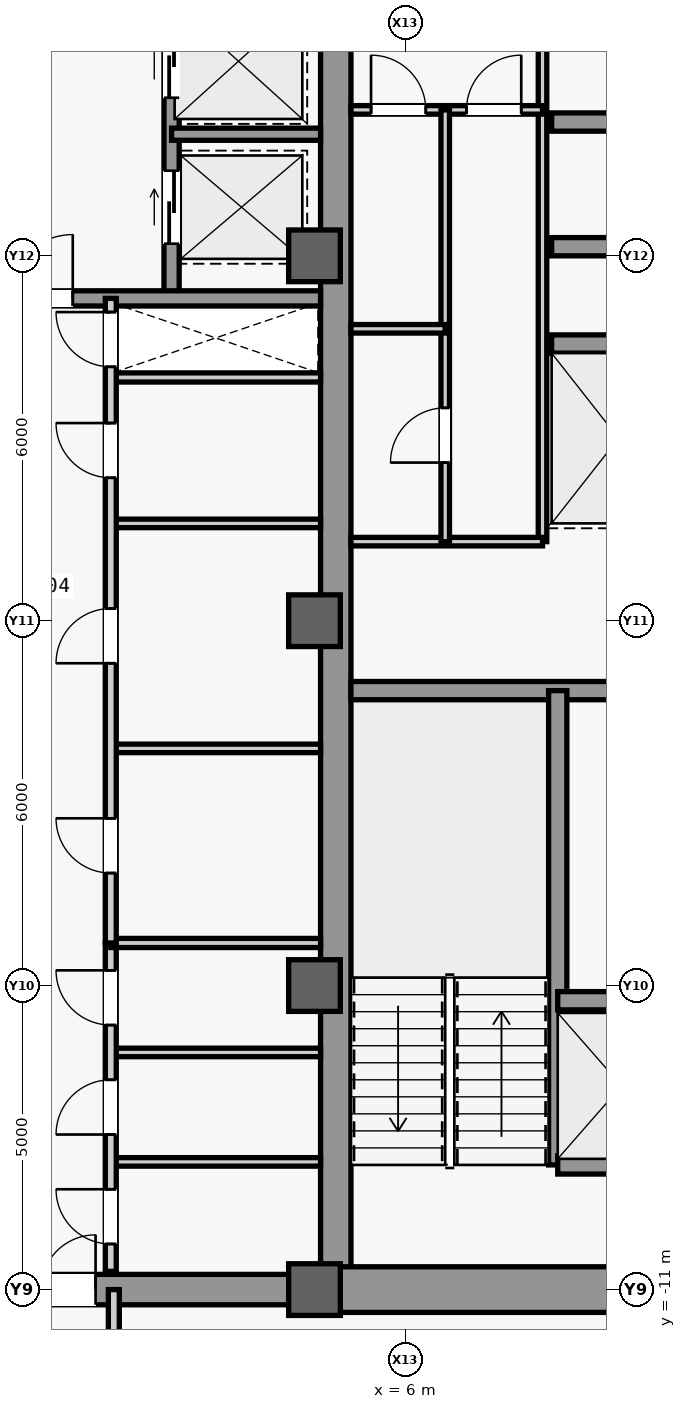
"""IFC4 building model, lengths in metres.
Left out: names, types, materials, properties, quantities, classifications, styles, units other than length and angle.
Written with IfcOpenShell. Run it as: python <this file> out.ifc"""

import sys

from ifc_helpers import new_model, si_unit, direction, frame, frame_2d, origin, origin_2d, place, context, subcontext, project, spatial, rectangle, extrude, source, transform, mapped, element, fill, save


model = new_model("IFC4")
c1 = context("Model", 3, precision=1e-05, world=origin(), true_north=direction((0.0, 1.0)))
c2 = subcontext(c1, "Body", "Model", "MODEL_VIEW")
j1 = project(units=[si_unit("LENGTHUNIT", "METRE"), si_unit("PLANEANGLEUNIT", "RADIAN")], contexts=[c1])
p1 = place(None, origin())
s1 = spatial("IfcSite", under=j1, at=p1, CompositionType="ELEMENT")
p2 = place(p1, origin())
s2 = spatial("IfcBuilding", under=s1, at=p2, CompositionType="ELEMENT")
p3 = place(p2, frame((0.0, 0.0, 183.1)))
s3 = spatial("IfcBuildingStorey", under=s2, at=p3, CompositionType="ELEMENT", Elevation=183.1)
m1 = source(origin(), c2, "Body", "SweptSolid", [
    extrude(rectangle(XDim=21.4, YDim=0.5, at=frame_2d((10.7, 0.0))), origin(), (0.0, 0.0, 1.0), 3.78),
])
p4 = place(p3, frame((4.85, -10.7, 0.0), z_axis=(0.0, 0.0, 1.0), x_axis=(0.0, 1.0, 0.0)))
e1 = element("IfcWall", 1, at=p4, inside=s3, PredefinedType="SHEAR", context=c2, shape_type="MappedRepresentation", body=[
    mapped(m1, transform((0.0, 0.0, 0.0), scale=1.0)),
])
m2 = source(origin(), c2, "Body", "SweptSolid", [
    extrude(rectangle(XDim=5.85, YDim=0.75, at=frame_2d((2.925, 0.0))), origin(), (0.0, 0.0, 1.0), 3.78),
])
p5 = place(p3, frame((4.85, -11.0, 0.0), z_axis=(0.0, 0.0, 1.0), x_axis=(1.0, 0.0, 0.0)))
e2 = element("IfcWall", 2, at=p5, inside=s3, PredefinedType="SHEAR", context=c2, shape_type="MappedRepresentation", body=[
    mapped(m2, transform((0.0, 0.0, 0.0), scale=1.0)),
])
m3 = source(origin(), c2, "Body", "SweptSolid", [
    extrude(rectangle(XDim=5.6, YDim=0.3, at=frame_2d((2.8, 0.0))), origin(), (0.0, 0.0, 1.0), 3.78),
])
p6 = place(p3, frame((5.1, -1.15, 0.0), z_axis=(0.0, 0.0, 1.0), x_axis=(1.0, 0.0, 0.0)))
e3 = element("IfcWall", 3, at=p6, inside=s3, PredefinedType="SHEAR", context=c2, shape_type="MappedRepresentation", body=[
    mapped(m3, transform((0.0, 0.0, 0.0), scale=1.0)),
])
m4 = source(origin(), c2, "Body", "SweptSolid", [
    extrude(rectangle(XDim=9.2, YDim=0.5, at=frame_2d((4.6, 0.0))), origin(), (0.0, 0.0, 1.0), 3.78),
])
p7 = place(p3, frame((-4.6, -11.0, 0.0), z_axis=(0.0, 0.0, 1.0), x_axis=(1.0, 0.0, 0.0)))
e4 = element("IfcWall", 4, at=p7, inside=s3, PredefinedType="SHEAR", context=c2, shape_type="MappedRepresentation", body=[
    mapped(m4, transform((0.0, 0.0, 0.0), scale=1.0)),
])
m5 = source(origin(), c2, "Body", "SweptSolid", [
    extrude(rectangle(XDim=1.8, YDim=2.25, at=frame_2d((0.9, 1.125))), frame((0.0, 0.26, 0.0), z_axis=(0.0, -1.0, 0.0), x_axis=(1.0, 0.0, 0.0)), (0.0, 0.0, 1.0), 0.52),
])
p8 = place(p7, frame((3.7, 0.0, 0.0)))
e5 = element("IfcOpeningElement", 5, at=p8, cuts=e4, PredefinedType="OPENING", context=c2, shape_type="MappedRepresentation", body=[
    mapped(m5, transform((0.0, 0.0, 0.0), scale=1.0)),
])
m6 = source(origin(), c2, "Body", "SweptSolid", [
    extrude(rectangle(XDim=0.85, YDim=0.85, at=origin_2d()), origin(), (0.0, 0.0, 1.0), 4.0),
])
for number, where, z_axis, x_axis in (
    (6, (4.5, -11.0, 0.0), (0.0, 0.0, 1.0), (1.0, 0.0, 0.0)),
    (7, (4.5, -6.0, 0.0), (0.0, 0.0, 1.0), (1.0, 0.0, 0.0)),
    (8, (4.5, 0.0, 0.0), (0.0, 0.0, 1.0), (1.0, 0.0, 0.0)),
    (9, (4.5, 6.0, 0.0), (0.0, 0.0, 1.0), (1.0, 0.0, 0.0)),
):
    element("IfcColumn", number, at=place(p3, frame(where, z_axis=z_axis, x_axis=x_axis)), inside=s3, PredefinedType="COLUMN", context=c2, shape_type="MappedRepresentation", body=[
        mapped(m6, transform((0.0, 0.0, 0.0), scale=1.0)),
    ])
m7 = source(origin(), c2, "Body", "SweptSolid", [
    extrude(rectangle(XDim=7.8, YDim=0.3, at=frame_2d((3.9, 0.0))), origin(), (0.0, 0.0, 1.0), 3.78),
])
p9 = place(p3, frame((8.5, -8.95, 0.0), z_axis=(0.0, 0.0, 1.0), x_axis=(0.0, 1.0, 0.0)))
e10 = element("IfcWall", 10, at=p9, inside=s3, PredefinedType="SHEAR", context=c2, shape_type="MappedRepresentation", body=[
    mapped(m7, transform((0.0, 0.0, 0.0), scale=1.0)),
])
m8 = source(origin(), c2, "Body", "SweptSolid", [
    extrude(rectangle(XDim=2.2, YDim=0.3, at=frame_2d((1.1, 0.0))), origin(), (0.0, 0.0, 1.0), 3.78),
])
for number, where, z_axis, x_axis in (
    (11, (8.5, -8.95, 0.0), (0.0, 0.0, 1.0), (1.0, 0.0, 0.0)),
    (12, (8.5, -6.25, 0.0), (0.0, 0.0, 1.0), (1.0, 0.0, 0.0)),
):
    element("IfcWall", number, at=place(p3, frame(where, z_axis=z_axis, x_axis=x_axis)), inside=s3, PredefinedType="SHEAR", context=c2, shape_type="MappedRepresentation", body=[
        mapped(m8, transform((0.0, 0.0, 0.0), scale=1.0)),
    ])
m9 = source(origin(), c2, "Body", "SweptSolid", [
    extrude(rectangle(XDim=2.3, YDim=0.3, at=frame_2d((1.15, 0.0))), origin(), (0.0, 0.0, 1.0), 3.78),
])
for number, where, z_axis, x_axis in (
    (13, (8.4, 4.55, 0.0), (0.0, 0.0, 1.0), (1.0, 0.0, 0.0)),
    (14, (8.4, 6.15, 0.0), (0.0, 0.0, 1.0), (1.0, 0.0, 0.0)),
    (15, (8.4, 8.2, 0.0), (0.0, 0.0, 1.0), (1.0, 0.0, 0.0)),
):
    element("IfcWall", number, at=place(p3, frame(where, z_axis=z_axis, x_axis=x_axis)), inside=s3, PredefinedType="SHEAR", context=c2, shape_type="MappedRepresentation", body=[
        mapped(m9, transform((0.0, 0.0, 0.0), scale=1.0)),
    ])
m10 = source(origin(), c2, "Body", "SweptSolid", [
    extrude(rectangle(XDim=9.4, YDim=0.14, at=frame_2d((4.7, 0.0))), origin(), (0.0, 0.0, 1.0), 3.78),
])
p10 = place(p3, frame((8.25, 1.3, 0.0), z_axis=(0.0, 0.0, 1.0), x_axis=(0.0, 1.0, 0.0)))
e16 = element("IfcWall", 16, at=p10, inside=s3, PredefinedType="PARTITIONING", context=c2, shape_type="MappedRepresentation", body=[
    mapped(m10, transform((0.0, 0.0, 0.0), scale=1.0)),
])
m11 = source(origin(), c2, "Body", "SweptSolid", [
    extrude(rectangle(XDim=3.15, YDim=0.14, at=frame_2d((1.575, 0.0))), origin(), (0.0, 0.0, 1.0), 3.78),
])
p11 = place(p3, frame((5.1, 1.3, 0.0), z_axis=(0.0, 0.0, 1.0), x_axis=(1.0, 0.0, 0.0)))
e17 = element("IfcWall", 17, at=p11, inside=s3, PredefinedType="PARTITIONING", context=c2, shape_type="MappedRepresentation", body=[
    mapped(m11, transform((0.0, 0.0, 0.0), scale=1.0)),
])
p12 = place(p3, frame((5.1, 8.4, 0.0), z_axis=(0.0, 0.0, 1.0), x_axis=(1.0, 0.0, 0.0)))
e18 = element("IfcWall", 18, at=p12, inside=s3, PredefinedType="PARTITIONING", context=c2, shape_type="MappedRepresentation", body=[
    mapped(m11, transform((0.0, 0.0, 0.0), scale=1.0)),
])
m12 = source(origin(), c2, "Body", "SweptSolid", [
    extrude(rectangle(XDim=0.9, YDim=2.15, at=frame_2d((0.45, 1.075))), frame((0.0, 0.08, 0.0), z_axis=(0.0, -1.0, 0.0), x_axis=(1.0, 0.0, 0.0)), (0.0, 0.0, 1.0), 0.16),
])
p13 = place(p12, frame((0.33, 0.0, 0.0)))
e19 = element("IfcOpeningElement", 19, at=p13, cuts=e18, PredefinedType="OPENING", context=c2, shape_type="MappedRepresentation", body=[
    mapped(m12, transform((0.0, 0.0, 0.0), scale=1.0)),
])
p14 = place(p12, frame((1.9, 0.0, 0.0)))
e20 = element("IfcOpeningElement", 20, at=p14, cuts=e18, PredefinedType="OPENING", context=c2, shape_type="MappedRepresentation", body=[
    mapped(m12, transform((0.0, 0.0, 0.0), scale=1.0)),
])
m13 = source(origin(), c2, "Body", "SweptSolid", [
    extrude(rectangle(XDim=7.1, YDim=0.14, at=frame_2d((3.55, 0.0))), origin(), (0.0, 0.0, 1.0), 3.78),
])
p15 = place(p3, frame((6.65, 1.3, 0.0), z_axis=(0.0, 0.0, 1.0), x_axis=(0.0, 1.0, 0.0)))
e21 = element("IfcWall", 21, at=p15, inside=s3, PredefinedType="PARTITIONING", context=c2, shape_type="MappedRepresentation", body=[
    mapped(m13, transform((0.0, 0.0, 0.0), scale=1.0)),
])
p16 = place(p15, frame((1.3, 0.0, 0.0)))
e22 = element("IfcOpeningElement", 22, at=p16, cuts=e21, PredefinedType="OPENING", context=c2, shape_type="MappedRepresentation", body=[
    mapped(m12, transform((0.0, 0.0, 0.0), scale=1.0)),
])
m14 = source(origin(), c2, "Body", "SweptSolid", [
    extrude(rectangle(XDim=1.55, YDim=0.14, at=frame_2d((0.775, 0.0))), origin(), (0.0, 0.0, 1.0), 3.78),
])
p17 = place(p3, frame((5.1, 4.8, 0.0), z_axis=(0.0, 0.0, 1.0), x_axis=(1.0, 0.0, 0.0)))
e23 = element("IfcWall", 23, at=p17, inside=s3, PredefinedType="PARTITIONING", context=c2, shape_type="MappedRepresentation", body=[
    mapped(m14, transform((0.0, 0.0, 0.0), scale=1.0)),
])
m15 = source(origin(), c2, "Body", "SweptSolid", [
    extrude(rectangle(XDim=3.45, YDim=0.15, at=frame_2d((1.725, 0.0))), origin(), (0.0, 0.0, 1.0), 3.78),
])
p18 = place(p3, frame((1.15, 4.0, 0.0), z_axis=(0.0, 0.0, 1.0), x_axis=(1.0, 0.0, 0.0)))
e24 = element("IfcWall", 24, at=p18, inside=s3, PredefinedType="PARTITIONING", context=c2, shape_type="MappedRepresentation", body=[
    mapped(m15, transform((0.0, 0.0, 0.0), scale=1.0)),
])
m16 = source(origin(), c2, "Body", "SweptSolid", [
    extrude(rectangle(XDim=3.45, YDim=0.14, at=frame_2d((1.725, 0.0))), origin(), (0.0, 0.0, 1.0), 3.78),
])
for number, where, z_axis, x_axis in (
    (25, (1.15, -8.9, 0.0), (0.0, 0.0, 1.0), (1.0, 0.0, 0.0)),
    (26, (1.15, -7.1, 0.0), (0.0, 0.0, 1.0), (1.0, 0.0, 0.0)),
):
    element("IfcWall", number, at=place(p3, frame(where, z_axis=z_axis, x_axis=x_axis)), inside=s3, PredefinedType="PARTITIONING", context=c2, shape_type="MappedRepresentation", body=[
        mapped(m16, transform((0.0, 0.0, 0.0), scale=1.0)),
    ])
m17 = source(origin(), c2, "Body", "SweptSolid", [
    extrude(rectangle(XDim=5.4, YDim=0.18, at=frame_2d((2.7, 0.0))), origin(), (0.0, 0.0, 1.0), 3.78),
])
p19 = place(p3, frame((1.15, -10.7, 0.0), z_axis=(0.0, 0.0, 1.0), x_axis=(0.0, 1.0, 0.0)))
e27 = element("IfcWall", 27, at=p19, inside=s3, PredefinedType="PARTITIONING", context=c2, shape_type="MappedRepresentation", body=[
    mapped(m17, transform((0.0, 0.0, 0.0), scale=1.0)),
])
m18 = source(origin(), c2, "Body", "SweptSolid", [
    extrude(rectangle(XDim=0.9, YDim=2.15, at=frame_2d((0.45, 1.075))), frame((0.0, 0.1, 0.0), z_axis=(0.0, -1.0, 0.0), x_axis=(1.0, 0.0, 0.0)), (0.0, 0.0, 1.0), 0.2),
])
p20 = place(p19, frame((0.45, 0.0, 0.0)))
e28 = element("IfcOpeningElement", 28, at=p20, cuts=e27, PredefinedType="OPENING", context=c2, shape_type="MappedRepresentation", body=[
    mapped(m18, transform((0.0, 0.0, 0.0), scale=1.0)),
])
p21 = place(p19, frame((2.25, 0.0, 0.0)))
e29 = element("IfcOpeningElement", 29, at=p21, cuts=e27, PredefinedType="OPENING", context=c2, shape_type="MappedRepresentation", body=[
    mapped(m18, transform((0.0, 0.0, 0.0), scale=1.0)),
])
p22 = place(p19, frame((4.05, 0.0, 0.0)))
e30 = element("IfcOpeningElement", 30, at=p22, cuts=e27, PredefinedType="OPENING", context=c2, shape_type="MappedRepresentation", body=[
    mapped(m18, transform((0.0, 0.0, 0.0), scale=1.0)),
])
p23 = place(p3, frame((1.15, -5.3, 0.0), z_axis=(0.0, 0.0, 1.0), x_axis=(1.0, 0.0, 0.0)))
e31 = element("IfcWall", 31, at=p23, inside=s3, PredefinedType="PARTITIONING", context=c2, shape_type="MappedRepresentation", body=[
    mapped(m15, transform((0.0, 0.0, 0.0), scale=1.0)),
])
m19 = source(origin(), c2, "Body", "SweptSolid", [
    extrude(rectangle(XDim=5.4, YDim=0.25, at=frame_2d((2.7, 0.0))), origin(), (0.0, 0.0, 1.0), 3.78),
])
p24 = place(p3, frame((2.15, 5.3, 0.0), z_axis=(0.0, 0.0, 1.0), x_axis=(0.0, 1.0, 0.0)))
e32 = element("IfcWall", 32, at=p24, inside=s3, PredefinedType="SHEAR", context=c2, shape_type="MappedRepresentation", body=[
    mapped(m19, transform((0.0, 0.0, 0.0), scale=1.0)),
])
m20 = source(origin(), c2, "Body", "SweptSolid", [
    extrude(rectangle(XDim=1.2, YDim=2.3, at=frame_2d((0.6, 1.15))), frame((0.0, 0.135, 0.0), z_axis=(0.0, -1.0, 0.0), x_axis=(1.0, 0.0, 0.0)), (0.0, 0.0, 1.0), 0.27),
])
p25 = place(p24, frame((3.3, 0.0, 0.0)))
e33 = element("IfcOpeningElement", 33, at=p25, cuts=e32, PredefinedType="OPENING", context=c2, shape_type="MappedRepresentation", body=[
    mapped(m20, transform((0.0, 0.0, 0.0), scale=1.0)),
])
p26 = place(p24, frame((0.9, 0.0, 0.0)))
e34 = element("IfcOpeningElement", 34, at=p26, cuts=e32, PredefinedType="OPENING", context=c2, shape_type="MappedRepresentation", body=[
    mapped(m20, transform((0.0, 0.0, 0.0), scale=1.0)),
])
m21 = source(origin(), c2, "Body", "SweptSolid", [
    extrude(rectangle(XDim=2.45, YDim=0.2, at=frame_2d((1.225, 0.0))), origin(), (0.0, 0.0, 1.0), 3.78),
])
p27 = place(p3, frame((2.15, 8.0, 0.0), z_axis=(0.0, 0.0, 1.0), x_axis=(1.0, 0.0, 0.0)))
e35 = element("IfcWall", 35, at=p27, inside=s3, PredefinedType="SHEAR", context=c2, shape_type="MappedRepresentation", body=[
    mapped(m21, transform((0.0, 0.0, 0.0), scale=1.0)),
])
m22 = source(origin(), c2, "Body", "SweptSolid", [
    extrude(rectangle(XDim=9.2, YDim=0.25, at=frame_2d((4.6, 0.0))), origin(), (0.0, 0.0, 1.0), 3.78),
])
p28 = place(p3, frame((-4.6, 5.3, 0.0), z_axis=(0.0, 0.0, 1.0), x_axis=(1.0, 0.0, 0.0)))
e36 = element("IfcWall", 36, at=p28, inside=s3, PredefinedType="SHEAR", context=c2, shape_type="MappedRepresentation", body=[
    mapped(m22, transform((0.0, 0.0, 0.0), scale=1.0)),
])
m23 = source(origin(), c2, "Body", "SweptSolid", [
    extrude(rectangle(XDim=1.05, YDim=2.2, at=frame_2d((0.525, 1.1))), frame((0.0, 0.135, 0.0), z_axis=(0.0, -1.0, 0.0), x_axis=(1.0, 0.0, 0.0)), (0.0, 0.0, 1.0), 0.27),
])
p29 = place(p28, frame((4.075, 0.0, 0.0)))
e37 = element("IfcOpeningElement", 37, at=p29, cuts=e36, PredefinedType="OPENING", context=c2, shape_type="MappedRepresentation", body=[
    mapped(m23, transform((0.0, 0.0, 0.0), scale=1.0)),
])
for number, where, z_axis, x_axis in (
    (38, (1.15, -2.1, 0.0), (0.0, 0.0, 1.0), (1.0, 0.0, 0.0)),
    (39, (1.15, 1.6, 0.0), (0.0, 0.0, 1.0), (1.0, 0.0, 0.0)),
):
    element("IfcWall", number, at=place(p3, frame(where, z_axis=z_axis, x_axis=x_axis)), inside=s3, PredefinedType="PARTITIONING", context=c2, shape_type="MappedRepresentation", body=[
        mapped(m16, transform((0.0, 0.0, 0.0), scale=1.0)),
    ])
m24 = source(origin(), c2, "Body", "SweptSolid", [
    extrude(rectangle(XDim=10.6, YDim=0.18, at=frame_2d((5.3, 0.0))), origin(), (0.0, 0.0, 1.0), 3.78),
])
p30 = place(p3, frame((1.15, -5.3, 0.0), z_axis=(0.0, 0.0, 1.0), x_axis=(0.0, 1.0, 0.0)))
e40 = element("IfcWall", 40, at=p30, inside=s3, PredefinedType="PARTITIONING", context=c2, shape_type="MappedRepresentation", body=[
    mapped(m24, transform((0.0, 0.0, 0.0), scale=1.0)),
])
p31 = place(p30, frame((1.15, 0.0, 0.0)))
e41 = element("IfcOpeningElement", 41, at=p31, cuts=e40, PredefinedType="OPENING", context=c2, shape_type="MappedRepresentation", body=[
    mapped(m18, transform((0.0, 0.0, 0.0), scale=1.0)),
])
p32 = place(p30, frame((4.6, 0.0, 0.0)))
e42 = element("IfcOpeningElement", 42, at=p32, cuts=e40, PredefinedType="OPENING", context=c2, shape_type="MappedRepresentation", body=[
    mapped(m18, transform((0.0, 0.0, 0.0), scale=1.0)),
])
p33 = place(p30, frame((7.65, 0.0, 0.0)))
e43 = element("IfcOpeningElement", 43, at=p33, cuts=e40, PredefinedType="OPENING", context=c2, shape_type="MappedRepresentation", body=[
    mapped(m18, transform((0.0, 0.0, 0.0), scale=1.0)),
])
p34 = place(p30, frame((9.475, 0.0, 0.0)))
e44 = element("IfcOpeningElement", 44, at=p34, cuts=e40, PredefinedType="OPENING", context=c2, shape_type="MappedRepresentation", body=[
    mapped(m18, transform((0.0, 0.0, 0.0), scale=1.0)),
])
m25 = source(origin(), c2, "Body", "SweptSolid", [
    extrude(rectangle(XDim=2.6, YDim=0.18, at=frame_2d((1.3, 0.0))), origin(), (0.0, 0.0, 1.0), 3.78),
])
p35 = place(p3, frame((1.2, -13.6, 0.0), z_axis=(0.0, 0.0, 1.0), x_axis=(0.0, 1.0, 0.0)))
e45 = element("IfcWall", 45, at=p35, inside=s3, PredefinedType="PARTITIONING", context=c2, shape_type="MappedRepresentation", body=[
    mapped(m25, transform((0.0, 0.0, 0.0), scale=1.0)),
])
m26 = source(origin(), c2, "Body", "SweptSolid", [
    extrude(rectangle(XDim=0.9, YDim=2.15, at=frame_2d((0.45, 1.075))), frame((0.0, 0.025, 0.0), z_axis=(0.0, -1.0, 0.0), x_axis=(1.0, 0.0, 0.0)), (0.0, 0.0, 1.0), 0.05),
])
p36 = place(p13, origin())
e46 = element("IfcDoor", 46, at=p36, inside=s3, OperationType="SINGLE_SWING_LEFT", PredefinedType="DOOR", context=c2, shape_type="MappedRepresentation", body=[
    mapped(m26, transform((0.0, 0.0, 0.0), scale=1.0)),
])
fill(e19, e46)
p37 = place(p14, origin())
e47 = element("IfcDoor", 47, at=p37, inside=s3, OperationType="SINGLE_SWING_RIGHT", PredefinedType="DOOR", context=c2, shape_type="MappedRepresentation", body=[
    mapped(m26, transform((0.0, 0.0, 0.0), scale=1.0)),
])
fill(e20, e47)
p38 = place(p16, origin())
e48 = element("IfcDoor", 48, at=p38, inside=s3, OperationType="SINGLE_SWING_LEFT", PredefinedType="DOOR", context=c2, shape_type="MappedRepresentation", body=[
    mapped(m26, transform((0.0, 0.0, 0.0), scale=1.0)),
])
fill(e22, e48)
p39 = place(p20, origin())
e49 = element("IfcDoor", 49, at=p39, inside=s3, OperationType="SINGLE_SWING_RIGHT", PredefinedType="DOOR", context=c2, shape_type="MappedRepresentation", body=[
    mapped(m26, transform((0.0, 0.0, 0.0), scale=1.0)),
])
fill(e28, e49)
p40 = place(p21, origin())
e50 = element("IfcDoor", 50, at=p40, inside=s3, OperationType="SINGLE_SWING_LEFT", PredefinedType="DOOR", context=c2, shape_type="MappedRepresentation", body=[
    mapped(m26, transform((0.0, 0.0, 0.0), scale=1.0)),
])
fill(e29, e50)
p41 = place(p22, origin())
e51 = element("IfcDoor", 51, at=p41, inside=s3, OperationType="SINGLE_SWING_RIGHT", PredefinedType="DOOR", context=c2, shape_type="MappedRepresentation", body=[
    mapped(m26, transform((0.0, 0.0, 0.0), scale=1.0)),
])
fill(e30, e51)
m27 = source(origin(), c2, "Body", "SweptSolid", [
    extrude(rectangle(XDim=1.8, YDim=2.25, at=frame_2d((0.9, 1.125))), frame((0.0, 0.025, 0.0), z_axis=(0.0, -1.0, 0.0), x_axis=(1.0, 0.0, 0.0)), (0.0, 0.0, 1.0), 0.05),
])
p42 = place(p8, origin())
e52 = element("IfcDoor", 52, at=p42, inside=s3, OperationType="SINGLE_SWING_LEFT", PredefinedType="DOOR", context=c2, shape_type="MappedRepresentation", body=[
    mapped(m27, transform((0.0, 0.0, 0.0), scale=1.0)),
])
fill(e5, e52)
m28 = source(origin(), c2, "Body", "SweptSolid", [
    extrude(rectangle(XDim=1.05, YDim=2.2, at=frame_2d((0.525, 1.1))), frame((0.0, 0.025, 0.0), z_axis=(0.0, -1.0, 0.0), x_axis=(1.0, 0.0, 0.0)), (0.0, 0.0, 1.0), 0.05),
])
p43 = place(p29, origin())
e53 = element("IfcDoor", 53, at=p43, inside=s3, OperationType="SINGLE_SWING_RIGHT", PredefinedType="DOOR", context=c2, shape_type="MappedRepresentation", body=[
    mapped(m28, transform((0.0, 0.0, 0.0), scale=1.0)),
])
fill(e37, e53)
p44 = place(p31, origin())
e54 = element("IfcDoor", 54, at=p44, inside=s3, OperationType="SINGLE_SWING_RIGHT", PredefinedType="DOOR", context=c2, shape_type="MappedRepresentation", body=[
    mapped(m26, transform((0.0, 0.0, 0.0), scale=1.0)),
])
fill(e41, e54)
p45 = place(p32, origin())
e55 = element("IfcDoor", 55, at=p45, inside=s3, OperationType="SINGLE_SWING_LEFT", PredefinedType="DOOR", context=c2, shape_type="MappedRepresentation", body=[
    mapped(m26, transform((0.0, 0.0, 0.0), scale=1.0)),
])
fill(e42, e55)
p46 = place(p33, origin())
e56 = element("IfcDoor", 56, at=p46, inside=s3, OperationType="SINGLE_SWING_RIGHT", PredefinedType="DOOR", context=c2, shape_type="MappedRepresentation", body=[
    mapped(m26, transform((0.0, 0.0, 0.0), scale=1.0)),
])
fill(e43, e56)
p47 = place(p34, origin())
e57 = element("IfcDoor", 57, at=p47, inside=s3, OperationType="SINGLE_SWING_RIGHT", PredefinedType="DOOR", context=c2, shape_type="MappedRepresentation", body=[
    mapped(m26, transform((0.0, 0.0, 0.0), scale=1.0)),
])
fill(e44, e57)
m29 = source(origin(), c2, "Body", "SweptSolid", [
    extrude(rectangle(XDim=1.2, YDim=2.3, at=frame_2d((0.6, 1.15))), frame((0.0, 0.025, 0.0), z_axis=(0.0, -1.0, 0.0), x_axis=(1.0, 0.0, 0.0)), (0.0, 0.0, 1.0), 0.05),
])
p48 = place(p25, origin())
e58 = element("IfcDoor", 58, at=p48, inside=s3, OperationType="SLIDING_TO_LEFT", PredefinedType="DOOR", context=c2, shape_type="MappedRepresentation", body=[
    mapped(m29, transform((0.0, 0.0, 0.0), scale=1.0)),
])
fill(e33, e58)
p49 = place(p26, origin())
e59 = element("IfcDoor", 59, at=p49, inside=s3, OperationType="SLIDING_TO_LEFT", PredefinedType="DOOR", context=c2, shape_type="MappedRepresentation", body=[
    mapped(m29, transform((0.0, 0.0, 0.0), scale=1.0)),
])
fill(e34, e59)
save(model, sys.argv[1])
